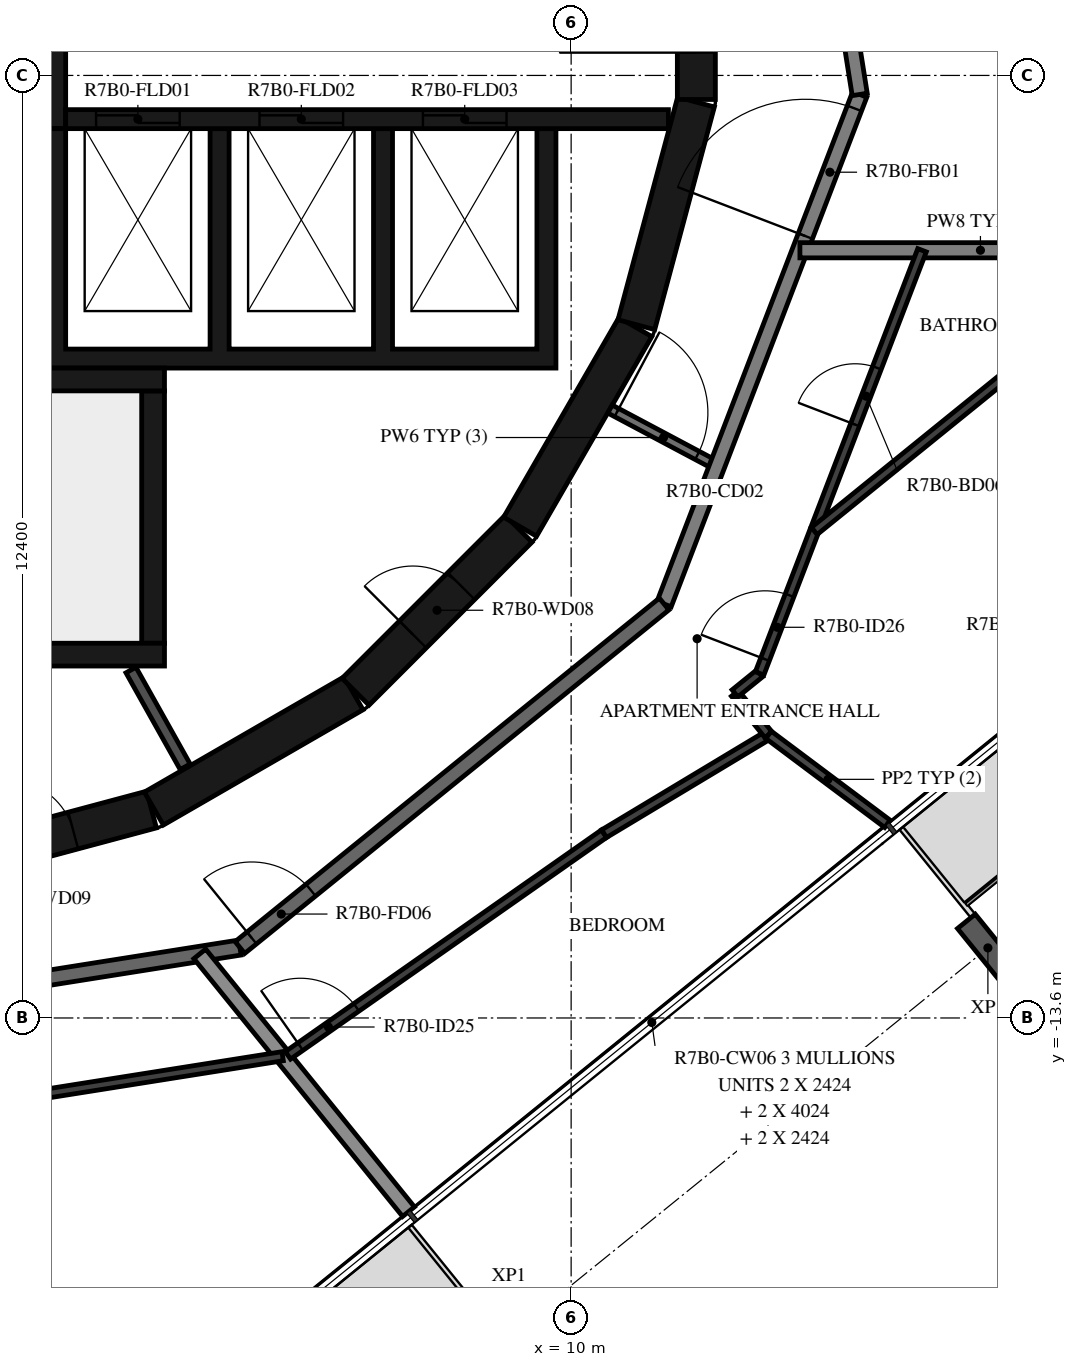
"""IFC4 building model, lengths in metres.
Left out: names, types, materials, properties, quantities, classifications, styles, units other than length and angle.
Written with IfcOpenShell. Run it as: python <this file> out.ifc"""

import sys

from ifc_helpers import new_model, si_unit, direction, frame, frame_2d, origin, origin_2d, place, context, subcontext, project, spatial, polyline, rectangle, i_section, outline, extrude, element, fill, save


model = new_model("IFC4")
c1 = context("Model", 3, precision=1e-05, world=origin(), true_north=direction((0.0, 1.0)))
c2 = subcontext(c1, "Body", "Model", "MODEL_VIEW")
j1 = project(units=[si_unit("LENGTHUNIT", "METRE"), si_unit("PLANEANGLEUNIT", "RADIAN")], contexts=[c1])
p1 = place(None, origin())
s1 = spatial("IfcSite", under=j1, at=p1, CompositionType="ELEMENT")
p2 = place(p1, origin())
s2 = spatial("IfcBuilding", under=s1, at=p2, CompositionType="ELEMENT")
p3 = place(p2, frame((0.0, 0.0, 277.4)))
s3 = spatial("IfcBuildingStorey", under=s2, at=p3, CompositionType="ELEMENT", Elevation=277.4)
p4 = place(p3, frame((15.483, -12.678, -0.38), z_axis=(0.0, 0.0, 1.0), x_axis=(-0.777146167973, -0.629320136024, 0.0)))
e1 = element("IfcColumn", 1, at=p4, inside=s3, PredefinedType="COLUMN", context=c2, shape_type="SweptSolid", body=[
    extrude(i_section(OverallWidth=0.3, OverallDepth=0.9, WebThickness=0.019, FlangeThickness=0.035, FilletRadius=0.03, at=origin_2d()), origin(), (0.0, 0.0, 1.0), 3.5),
])
p5 = place(p3, frame((1.55, -11.643, 0.0), z_axis=(0.0, 0.0, 1.0), x_axis=(0.965948410781, 0.258734743916, 0.0)))
e2 = element("IfcWall", 2, at=p5, inside=s3, PredefinedType="SHEAR", context=c2, shape_type="SweptSolid", body=[
    extrude(rectangle(XDim=3.033, YDim=0.5, at=frame_2d((1.516, 0.0))), origin(), (0.0, 0.0, 1.0), 3.12),
])
p6 = place(p5, frame((1.066, 0.0, 0.0)))
e3 = element("IfcOpeningElement", 3, at=p6, cuts=e2, PredefinedType="OPENING", context=c2, shape_type="SweptSolid", body=[
    extrude(rectangle(XDim=0.9, YDim=2.1, at=frame_2d((0.45, 1.05))), frame((0.0, 0.26, 0.0), z_axis=(0.0, -1.0, 0.0), x_axis=(1.0, 0.0, 0.0)), (0.0, 0.0, 1.0), 0.52),
])
p7 = place(p3, frame((4.51, -10.845, 0.0), z_axis=(0.0, 0.0, 1.0), x_axis=(0.865975092491, 0.500087131594, 0.0)))
e4 = element("IfcWall", 4, at=p7, inside=s3, PredefinedType="SHEAR", context=c2, shape_type="SweptSolid", body=[
    extrude(rectangle(XDim=3.033, YDim=0.5, at=frame_2d((1.516, 0.0))), origin(), (0.0, 0.0, 1.0), 3.12),
])
p8 = place(p3, frame((7.164, -9.308, 0.0), z_axis=(0.0, 0.0, 1.0), x_axis=(0.707106781187, 0.707106781187, 0.0)))
e5 = element("IfcWall", 5, at=p8, inside=s3, PredefinedType="SHEAR", context=c2, shape_type="SweptSolid", body=[
    extrude(rectangle(XDim=3.032, YDim=0.5, at=frame_2d((1.516, 0.0))), origin(), (0.0, 0.0, 1.0), 3.12),
])
p9 = place(p8, frame((1.066, 0.0, 0.0)))
e6 = element("IfcOpeningElement", 6, at=p9, cuts=e5, PredefinedType="OPENING", context=c2, shape_type="SweptSolid", body=[
    extrude(rectangle(XDim=0.9, YDim=2.1, at=frame_2d((0.45, 1.05))), frame((0.0, 0.26, 0.0), z_axis=(0.0, -1.0, 0.0), x_axis=(1.0, 0.0, 0.0)), (0.0, 0.0, 1.0), 0.52),
])
for number, where, z_axis, x_axis in (
    (7, (9.329, -7.137, 0.0), (0.0, 0.0, 1.0), (0.5, 0.866, 0.0)),
    (8, (10.858, -4.479, 0.0), (0.0, 0.0, 1.0), (0.259, 0.966, 0.0)),
):
    element("IfcWall", number, at=place(p3, frame(where, z_axis=z_axis, x_axis=x_axis)), inside=s3, PredefinedType="SHEAR", context=c2, shape_type="SweptSolid", body=[
        extrude(rectangle(XDim=3.033, YDim=0.5, at=frame_2d((1.516, 0.0))), origin(), (0.0, 0.0, 1.0), 3.12),
    ])
p10 = place(p3, frame((11.647, -1.516, 0.0), z_axis=(0.0, 0.0, 1.0), x_axis=(0.0, 1.0, 0.0)))
e9 = element("IfcWall", 9, at=p10, inside=s3, PredefinedType="SHEAR", context=c2, shape_type="SweptSolid", body=[
    extrude(rectangle(XDim=3.033, YDim=0.5, at=frame_2d((1.516, 0.0))), origin(), (0.0, 0.0, 1.0), 3.12),
])
p11 = place(p10, frame((0.616, 0.0, 0.0)))
e10 = element("IfcOpeningElement", 10, at=p11, cuts=e9, PredefinedType="OPENING", context=c2, shape_type="SweptSolid", body=[
    extrude(rectangle(XDim=1.8, YDim=2.1, at=frame_2d((0.9, 1.05))), frame((0.0, 0.26, 0.0), z_axis=(0.0, -1.0, 0.0), x_axis=(1.0, 0.0, 0.0)), (0.0, 0.0, 1.0), 0.52),
])
p12 = place(p3, frame((-2.4, -5.2, 0.0), z_axis=(0.0, 0.0, 1.0), x_axis=(1.0, 0.0, 0.0)))
e11 = element("IfcWall", 11, at=p12, inside=s3, PredefinedType="SHEAR", context=c2, shape_type="SweptSolid", body=[
    extrude(rectangle(XDim=7.05, YDim=0.3, at=frame_2d((3.525, 0.0))), origin(), (0.0, 0.0, 1.0), 3.12),
])
p13 = place(p3, frame((4.5, -8.67, 0.0), z_axis=(0.0, 0.0, 1.0), x_axis=(0.0, 1.0, 0.0)))
e12 = element("IfcWall", 12, at=p13, inside=s3, PredefinedType="SHEAR", context=c2, shape_type="SweptSolid", body=[
    extrude(rectangle(XDim=3.32, YDim=0.3, at=frame_2d((1.66, 0.0))), origin(), (0.0, 0.0, 1.0), 3.12),
])
p14 = place(p3, frame((0.1, -8.82, 0.0), z_axis=(0.0, 0.0, 1.0), x_axis=(1.0, 0.0, 0.0)))
e13 = element("IfcWall", 13, at=p14, inside=s3, PredefinedType="SHEAR", context=c2, shape_type="SweptSolid", body=[
    extrude(rectangle(XDim=4.55, YDim=0.3, at=frame_2d((2.275, 0.0))), origin(), (0.0, 0.0, 1.0), 3.12),
])
p15 = place(p3, origin())
e14 = element("IfcWall", 14, at=p15, inside=s3, PredefinedType="SHEAR", context=c2, shape_type="SweptSolid", body=[
    extrude(outline(polyline([(9.8, -5.05), (9.8, -4.8), (9.8, -1.9), (9.55, -1.9), (9.55, -4.8), (7.65, -4.8), (7.65, -1.9), (7.4, -1.9), (7.4, -4.8), (5.5, -4.8), (5.5, -1.9), (5.25, -1.9), (5.25, -4.8), (3.35, -4.8), (3.35, -1.9), (3.1, -1.9), (3.1, -4.8), (1.2, -4.8), (1.2, -1.9), (0.95, -1.9), (0.95, -4.8), (-0.95, -4.8), (-0.95, -1.9), (-1.2, -1.9), (-1.2, -4.8), (-3.1, -4.8), (-3.1, -1.9), (-3.35, -1.9), (-3.35, -4.8), (-5.25, -4.8), (-5.25, -1.9), (-5.5, -1.9), (-5.5, -4.8), (-9.55, -4.8), (-9.55, -1.9), (-9.8, -1.9), (-9.8, -4.8), (-9.8, -5.05), (9.8, -5.05)])), origin(), (0.0, 0.0, 1.0), 3.12),
])
p16 = place(p3, frame((3.35, -1.775, 0.0), z_axis=(0.0, 0.0, 1.0), x_axis=(1.0, 0.0, 0.0)))
e15 = element("IfcWall", 15, at=p16, inside=s3, PredefinedType="SHEAR", context=c2, shape_type="SweptSolid", body=[
    extrude(rectangle(XDim=7.93, YDim=0.25, at=frame_2d((3.965, 0.0))), origin(), (0.0, 0.0, 1.0), 3.12),
])
p17 = place(p16, frame((0.4, 0.0, 0.0)))
e16 = element("IfcOpeningElement", 16, at=p17, cuts=e15, PredefinedType="OPENING", context=c2, shape_type="SweptSolid", body=[
    extrude(rectangle(XDim=1.1, YDim=2.4, at=frame_2d((0.55, 1.2))), frame((0.0, 0.135, 0.0), z_axis=(0.0, -1.0, 0.0), x_axis=(1.0, 0.0, 0.0)), (0.0, 0.0, 1.0), 0.27),
])
p18 = place(p16, frame((2.55, 0.0, 0.0)))
e17 = element("IfcOpeningElement", 17, at=p18, cuts=e15, PredefinedType="OPENING", context=c2, shape_type="SweptSolid", body=[
    extrude(rectangle(XDim=1.1, YDim=2.4, at=frame_2d((0.55, 1.2))), frame((0.0, 0.135, 0.0), z_axis=(0.0, -1.0, 0.0), x_axis=(1.0, 0.0, 0.0)), (0.0, 0.0, 1.0), 0.27),
])
p19 = place(p16, frame((4.7, 0.0, 0.0)))
e18 = element("IfcOpeningElement", 18, at=p19, cuts=e15, PredefinedType="OPENING", context=c2, shape_type="SweptSolid", body=[
    extrude(rectangle(XDim=1.1, YDim=2.4, at=frame_2d((0.55, 1.2))), frame((0.0, 0.135, 0.0), z_axis=(0.0, -1.0, 0.0), x_axis=(1.0, 0.0, 0.0)), (0.0, 0.0, 1.0), 0.27),
])
p20 = place(p3, frame((3.225, -1.9, 0.0), z_axis=(0.0, 0.0, 1.0), x_axis=(0.0, 1.0, 0.0)))
e19 = element("IfcWall", 19, at=p20, inside=s3, PredefinedType="SHEAR", context=c2, shape_type="SweptSolid", body=[
    extrude(rectangle(XDim=3.8, YDim=0.25, at=frame_2d((1.9, 0.0))), origin(), (0.0, 0.0, 1.0), 3.12),
])
p21 = place(p3, frame((4.922, -10.296, 0.0), z_axis=(0.0, 0.0, 1.0), x_axis=(-0.48860846254, 0.872503163509, 0.0)))
e20 = element("IfcWall", 20, at=p21, inside=s3, PredefinedType="PARTITIONING", context=c2, shape_type="SweptSolid", body=[
    extrude(rectangle(XDim=1.459, YDim=0.15, at=frame_2d((0.73, 0.0))), origin(), (0.0, 0.0, 1.0), 3.12),
])
p22 = place(p3, frame((10.511, -5.589, 0.0), z_axis=(0.0, 0.0, 1.0), x_axis=(0.882983002821, -0.469404960273, 0.0)))
e21 = element("IfcWall", 21, at=p22, inside=s3, PredefinedType="PARTITIONING", context=c2, shape_type="SweptSolid", body=[
    extrude(rectangle(XDim=1.596, YDim=0.12, at=frame_2d((0.798, 0.0))), origin(), (0.0, 0.0, 1.0), 3.12),
])
p23 = place(p22, frame((0.1, 0.0, 0.0)))
e22 = element("IfcOpeningElement", 22, at=p23, cuts=e21, PredefinedType="OPENING", context=c2, shape_type="SweptSolid", body=[
    extrude(rectangle(XDim=1.2, YDim=2.1, at=frame_2d((0.6, 1.05))), frame((0.0, 0.07, 0.0), z_axis=(0.0, -1.0, 0.0), x_axis=(1.0, 0.0, 0.0)), (0.0, 0.0, 1.0), 0.14),
])
p24 = place(p3, frame((11.223, -8.154, 0.0), z_axis=(0.0, 0.0, 1.0), x_axis=(0.358341090983, 0.93359073609, 0.0)))
e23 = element("IfcWall", 23, at=p24, inside=s3, PredefinedType="STANDARD", context=c2, shape_type="SweptSolid", body=[
    extrude(rectangle(XDim=7.181, YDim=0.2, at=frame_2d((3.59, 0.0))), origin(), (0.0, 0.0, 1.0), 3.12),
])
p25 = place(p24, frame((5.185, 0.0, 0.0)))
e24 = element("IfcOpeningElement", 24, at=p25, cuts=e23, PredefinedType="OPENING", context=c2, shape_type="SweptSolid", body=[
    extrude(rectangle(XDim=1.8, YDim=2.1, at=frame_2d((0.9, 1.05))), frame((0.0, 0.11, 0.0), z_axis=(0.0, -1.0, 0.0), x_axis=(1.0, 0.0, 0.0)), (0.0, 0.0, 1.0), 0.22),
])
p26 = place(p3, frame((13.797, -1.45, 0.0), z_axis=(0.0, 0.0, 1.0), x_axis=(-0.156421704315, 0.987690361611, 0.0)))
e25 = element("IfcWall", 25, at=p26, inside=s3, PredefinedType="STANDARD", context=c2, shape_type="SweptSolid", body=[
    extrude(rectangle(XDim=7.181, YDim=0.2, at=frame_2d((3.591, 0.0))), origin(), (0.0, 0.0, 1.0), 3.12),
])
p27 = place(p3, frame((-1.45, -13.797, 0.0), z_axis=(0.0, 0.0, 1.0), x_axis=(0.987690361611, 0.156421704315, 0.0)))
e26 = element("IfcWall", 26, at=p27, inside=s3, PredefinedType="STANDARD", context=c2, shape_type="SweptSolid", body=[
    extrude(rectangle(XDim=7.181, YDim=0.2, at=frame_2d((3.591, 0.0))), origin(), (0.0, 0.0, 1.0), 3.12),
])
p28 = place(p27, frame((0.2, 0.0, 0.0)))
e27 = element("IfcOpeningElement", 27, at=p28, cuts=e26, PredefinedType="OPENING", context=c2, shape_type="SweptSolid", body=[
    extrude(rectangle(XDim=1.0, YDim=2.1, at=frame_2d((0.5, 1.05))), frame((0.0, 0.11, 0.0), z_axis=(0.0, -1.0, 0.0), x_axis=(1.0, 0.0, 0.0)), (0.0, 0.0, 1.0), 0.22),
])
p29 = place(p3, frame((5.643, -12.673, 0.0), z_axis=(0.0, 0.0, 1.0), x_axis=(0.777160148113, 0.629302871585, 0.0)))
e28 = element("IfcWall", 28, at=p29, inside=s3, PredefinedType="STANDARD", context=c2, shape_type="SweptSolid", body=[
    extrude(rectangle(XDim=7.181, YDim=0.2, at=frame_2d((3.59, 0.0))), origin(), (0.0, 0.0, 1.0), 3.12),
])
p30 = place(p29, frame((0.2, 0.0, 0.0)))
e29 = element("IfcOpeningElement", 29, at=p30, cuts=e28, PredefinedType="OPENING", context=c2, shape_type="SweptSolid", body=[
    extrude(rectangle(XDim=1.0, YDim=2.1, at=frame_2d((0.5, 1.05))), frame((0.0, 0.11, 0.0), z_axis=(0.0, -1.0, 0.0), x_axis=(1.0, 0.0, 0.0)), (0.0, 0.0, 1.0), 0.22),
])
p31 = place(p3, frame((13.01, -3.5, 0.0), z_axis=(0.0, 0.0, 1.0), x_axis=(1.0, 0.0, 0.0)))
e30 = element("IfcWall", 30, at=p31, inside=s3, PredefinedType="STANDARD", context=c2, shape_type="SweptSolid", body=[
    extrude(rectangle(XDim=4.75, YDim=0.2, at=frame_2d((2.375, 0.0))), origin(), (0.0, 0.0, 1.0), 3.12),
])
p32 = place(p3, frame((7.861, -16.148, 0.0), z_axis=(0.0, 0.0, 1.0), x_axis=(-0.629330189513, 0.777138026716, 0.0)))
e31 = element("IfcWall", 31, at=p32, inside=s3, PredefinedType="STANDARD", context=c2, shape_type="SweptSolid", body=[
    extrude(rectangle(XDim=4.364, YDim=0.2, at=frame_2d((2.182, 0.0))), origin(), (0.0, 0.0, 1.0), 2.73),
])
p33 = place(p3, frame((-1.612, -15.341, 0.0), z_axis=(0.0, 0.0, 1.0), x_axis=(0.987687560018, 0.15643939333, 0.0)))
e32 = element("IfcWall", 32, at=p33, inside=s3, PredefinedType="PARTITIONING", context=c2, shape_type="SweptSolid", body=[
    extrude(rectangle(XDim=7.914, YDim=0.12, at=frame_2d((3.957, 0.0))), origin(), (0.0, 0.0, 1.0), 3.12),
])
p34 = place(p33, frame((2.978, 0.0, 0.0)))
e33 = element("IfcOpeningElement", 33, at=p34, cuts=e32, PredefinedType="OPENING", context=c2, shape_type="SweptSolid", body=[
    extrude(rectangle(XDim=0.9, YDim=2.1, at=frame_2d((0.45, 1.05))), frame((0.0, 0.07, 0.0), z_axis=(0.0, -1.0, 0.0), x_axis=(1.0, 0.0, 0.0)), (0.0, 0.0, 1.0), 0.14),
])
p35 = place(p3, frame((6.274, -14.092, 0.0), z_axis=(0.0, 0.0, 1.0), x_axis=(0.818755256003, 0.574142691992, 0.0)))
e34 = element("IfcWall", 34, at=p35, inside=s3, PredefinedType="PARTITIONING", context=c2, shape_type="SweptSolid", body=[
    extrude(rectangle(XDim=5.08, YDim=0.12, at=frame_2d((2.54, 0.0))), origin(), (0.0, 0.0, 1.0), 3.12),
])
p36 = place(p35, frame((0.2, 0.0, 0.0)))
e35 = element("IfcOpeningElement", 35, at=p36, cuts=e34, PredefinedType="OPENING", context=c2, shape_type="SweptSolid", body=[
    extrude(rectangle(XDim=0.9, YDim=2.1, at=frame_2d((0.45, 1.05))), frame((0.0, 0.07, 0.0), z_axis=(0.0, -1.0, 0.0), x_axis=(1.0, 0.0, 0.0)), (0.0, 0.0, 1.0), 0.14),
])
p37 = place(p3, frame((10.434, -11.175, 0.0), z_axis=(0.0, 0.0, 1.0), x_axis=(0.857117202926, 0.515121442427, 0.0)))
e36 = element("IfcWall", 36, at=p37, inside=s3, PredefinedType="PARTITIONING", context=c2, shape_type="SweptSolid", body=[
    extrude(rectangle(XDim=2.524, YDim=0.12, at=frame_2d((1.262, 0.0))), origin(), (0.0, 0.0, 1.0), 3.12),
])
p38 = place(p3, frame((12.597, -9.875, 0.0), z_axis=(0.0, 0.0, 1.0), x_axis=(-0.629138198612, 0.77729346263, 0.0)))
e37 = element("IfcWall", 37, at=p38, inside=s3, PredefinedType="PARTITIONING", context=c2, shape_type="SweptSolid", body=[
    extrude(rectangle(XDim=0.702, YDim=0.12, at=frame_2d((0.351, 0.0))), origin(), (0.0, 0.0, 1.0), 3.12),
])
p39 = place(p3, frame((12.156, -9.329, 0.0), z_axis=(0.0, 0.0, 1.0), x_axis=(0.777026645941, 0.629467704888, 0.0)))
e38 = element("IfcWall", 38, at=p39, inside=s3, PredefinedType="PARTITIONING", context=c2, shape_type="SweptSolid", body=[
    extrude(rectangle(XDim=0.417, YDim=0.12, at=frame_2d((0.208, 0.0))), origin(), (0.0, 0.0, 1.0), 3.12),
])
p40 = place(p3, frame((12.479, -9.067, 0.0), z_axis=(0.0, 0.0, 1.0), x_axis=(0.358372669661, 0.933578614601, 0.0)))
e39 = element("IfcWall", 39, at=p40, inside=s3, PredefinedType="PARTITIONING", context=c2, shape_type="SweptSolid", body=[
    extrude(rectangle(XDim=5.963, YDim=0.12, at=frame_2d((2.981, 0.0))), origin(), (0.0, 0.0, 1.0), 3.12),
])
p41 = place(p40, frame((0.2, 0.0, 0.0)))
e40 = element("IfcOpeningElement", 40, at=p41, cuts=e39, PredefinedType="OPENING", context=c2, shape_type="SweptSolid", body=[
    extrude(rectangle(XDim=0.9, YDim=2.1, at=frame_2d((0.45, 1.05))), frame((0.0, 0.07, 0.0), z_axis=(0.0, -1.0, 0.0), x_axis=(1.0, 0.0, 0.0)), (0.0, 0.0, 1.0), 0.14),
])
p42 = place(p40, frame((3.507, 0.0, 0.0)))
e41 = element("IfcOpeningElement", 41, at=p42, cuts=e39, PredefinedType="OPENING", context=c2, shape_type="SweptSolid", body=[
    extrude(rectangle(XDim=0.8, YDim=2.1, at=frame_2d((0.4, 1.05))), frame((0.0, 0.07, 0.0), z_axis=(0.0, -1.0, 0.0), x_axis=(1.0, 0.0, 0.0)), (0.0, 0.0, 1.0), 0.14),
])
p43 = place(p3, frame((14.161, -11.046, 0.0), z_axis=(0.0, 0.0, 1.0), x_axis=(-0.800434550749, 0.599420161463, 0.0)))
e42 = element("IfcWall", 42, at=p43, inside=s3, PredefinedType="PARTITIONING", context=c2, shape_type="SweptSolid", body=[
    extrude(rectangle(XDim=1.954, YDim=0.12, at=frame_2d((0.977, 0.0))), origin(), (0.0, 0.0, 1.0), 2.73),
])
p44 = place(p3, frame((17.76, -3.5, 0.0), z_axis=(0.0, 0.0, 1.0), x_axis=(-0.777133455716, -0.62933583404, 0.0)))
e43 = element("IfcWall", 43, at=p44, inside=s3, PredefinedType="PARTITIONING", context=c2, shape_type="SweptSolid", body=[
    extrude(rectangle(XDim=5.869, YDim=0.12, at=frame_2d((2.935, 0.0))), origin(), (0.0, 0.0, 1.0), 3.12),
])
p45 = place(p11, origin())
e44 = element("IfcDoor", 44, at=p45, inside=s3, OperationType="DOUBLE_DOOR_SINGLE_SWING", PredefinedType="DOOR", context=c2, shape_type="SweptSolid", body=[
    extrude(rectangle(XDim=1.8, YDim=2.1, at=frame_2d((0.9, 1.05))), frame((0.0, 0.025, 0.0), z_axis=(0.0, -1.0, 0.0), x_axis=(1.0, 0.0, 0.0)), (0.0, 0.0, 1.0), 0.05),
])
fill(e10, e44)
p46 = place(p17, origin())
e45 = element("IfcDoor", 45, at=p46, inside=s3, OperationType="DOUBLE_DOOR_SLIDING", PredefinedType="DOOR", context=c2, shape_type="SweptSolid", body=[
    extrude(rectangle(XDim=1.1, YDim=2.4, at=frame_2d((0.55, 1.2))), frame((0.0, 0.025, 0.0), z_axis=(0.0, -1.0, 0.0), x_axis=(1.0, 0.0, 0.0)), (0.0, 0.0, 1.0), 0.05),
])
fill(e16, e45)
p47 = place(p18, origin())
e46 = element("IfcDoor", 46, at=p47, inside=s3, OperationType="DOUBLE_DOOR_SLIDING", PredefinedType="DOOR", context=c2, shape_type="SweptSolid", body=[
    extrude(rectangle(XDim=1.1, YDim=2.4, at=frame_2d((0.55, 1.2))), frame((0.0, 0.025, 0.0), z_axis=(0.0, -1.0, 0.0), x_axis=(1.0, 0.0, 0.0)), (0.0, 0.0, 1.0), 0.05),
])
fill(e17, e46)
p48 = place(p19, origin())
e47 = element("IfcDoor", 47, at=p48, inside=s3, OperationType="DOUBLE_DOOR_SLIDING", PredefinedType="DOOR", context=c2, shape_type="SweptSolid", body=[
    extrude(rectangle(XDim=1.1, YDim=2.4, at=frame_2d((0.55, 1.2))), frame((0.0, 0.025, 0.0), z_axis=(0.0, -1.0, 0.0), x_axis=(1.0, 0.0, 0.0)), (0.0, 0.0, 1.0), 0.05),
])
fill(e18, e47)
p49 = place(p9, origin())
e48 = element("IfcDoor", 48, at=p49, inside=s3, OperationType="SINGLE_SWING_RIGHT", PredefinedType="DOOR", context=c2, shape_type="SweptSolid", body=[
    extrude(rectangle(XDim=0.9, YDim=2.1, at=frame_2d((0.45, 1.05))), frame((0.0, 0.025, 0.0), z_axis=(0.0, -1.0, 0.0), x_axis=(1.0, 0.0, 0.0)), (0.0, 0.0, 1.0), 0.05),
])
fill(e6, e48)
p50 = place(p6, origin())
e49 = element("IfcDoor", 49, at=p50, inside=s3, OperationType="SINGLE_SWING_LEFT", PredefinedType="DOOR", context=c2, shape_type="SweptSolid", body=[
    extrude(rectangle(XDim=0.9, YDim=2.1, at=frame_2d((0.45, 1.05))), frame((0.0, 0.025, 0.0), z_axis=(0.0, -1.0, 0.0), x_axis=(1.0, 0.0, 0.0)), (0.0, 0.0, 1.0), 0.05),
])
fill(e3, e49)
p51 = place(p30, origin())
e50 = element("IfcDoor", 50, at=p51, inside=s3, OperationType="SINGLE_SWING_LEFT", PredefinedType="DOOR", context=c2, shape_type="SweptSolid", body=[
    extrude(rectangle(XDim=1.0, YDim=2.1, at=frame_2d((0.5, 1.05))), frame((0.0, 0.025, 0.0), z_axis=(0.0, -1.0, 0.0), x_axis=(1.0, 0.0, 0.0)), (0.0, 0.0, 1.0), 0.05),
])
fill(e29, e50)
p52 = place(p36, origin())
e51 = element("IfcDoor", 51, at=p52, inside=s3, OperationType="SINGLE_SWING_LEFT", PredefinedType="DOOR", context=c2, shape_type="SweptSolid", body=[
    extrude(rectangle(XDim=0.9, YDim=2.1, at=frame_2d((0.45, 1.05))), frame((0.0, 0.025, 0.0), z_axis=(0.0, -1.0, 0.0), x_axis=(1.0, 0.0, 0.0)), (0.0, 0.0, 1.0), 0.05),
])
fill(e35, e51)
p53 = place(p41, origin())
e52 = element("IfcDoor", 52, at=p53, inside=s3, OperationType="SINGLE_SWING_RIGHT", PredefinedType="DOOR", context=c2, shape_type="SweptSolid", body=[
    extrude(rectangle(XDim=0.9, YDim=2.1, at=frame_2d((0.45, 1.05))), frame((0.0, 0.025, 0.0), z_axis=(0.0, -1.0, 0.0), x_axis=(1.0, 0.0, 0.0)), (0.0, 0.0, 1.0), 0.05),
])
fill(e40, e52)
p54 = place(p42, origin())
e53 = element("IfcDoor", 53, at=p54, inside=s3, OperationType="SINGLE_SWING_RIGHT", PredefinedType="DOOR", context=c2, shape_type="SweptSolid", body=[
    extrude(rectangle(XDim=0.8, YDim=2.1, at=frame_2d((0.4, 1.05))), frame((0.0, 0.025, 0.0), z_axis=(0.0, -1.0, 0.0), x_axis=(1.0, 0.0, 0.0)), (0.0, 0.0, 1.0), 0.05),
])
fill(e41, e53)
p55 = place(p23, origin())
e54 = element("IfcDoor", 54, at=p55, inside=s3, OperationType="DOUBLE_DOOR_SINGLE_SWING", PredefinedType="DOOR", context=c2, shape_type="SweptSolid", body=[
    extrude(rectangle(XDim=1.2, YDim=2.1, at=frame_2d((0.6, 1.05))), frame((0.0, 0.025, 0.0), z_axis=(0.0, -1.0, 0.0), x_axis=(1.0, 0.0, 0.0)), (0.0, 0.0, 1.0), 0.05),
])
fill(e22, e54)
p56 = place(p25, origin())
e55 = element("IfcDoor", 55, at=p56, inside=s3, OperationType="DOUBLE_DOOR_SINGLE_SWING", PredefinedType="DOOR", context=c2, shape_type="SweptSolid", body=[
    extrude(rectangle(XDim=1.8, YDim=2.1, at=frame_2d((0.9, 1.05))), frame((0.0, 0.025, 0.0), z_axis=(0.0, -1.0, 0.0), x_axis=(1.0, 0.0, 0.0)), (0.0, 0.0, 1.0), 0.05),
])
fill(e24, e55)
save(model, sys.argv[1])
